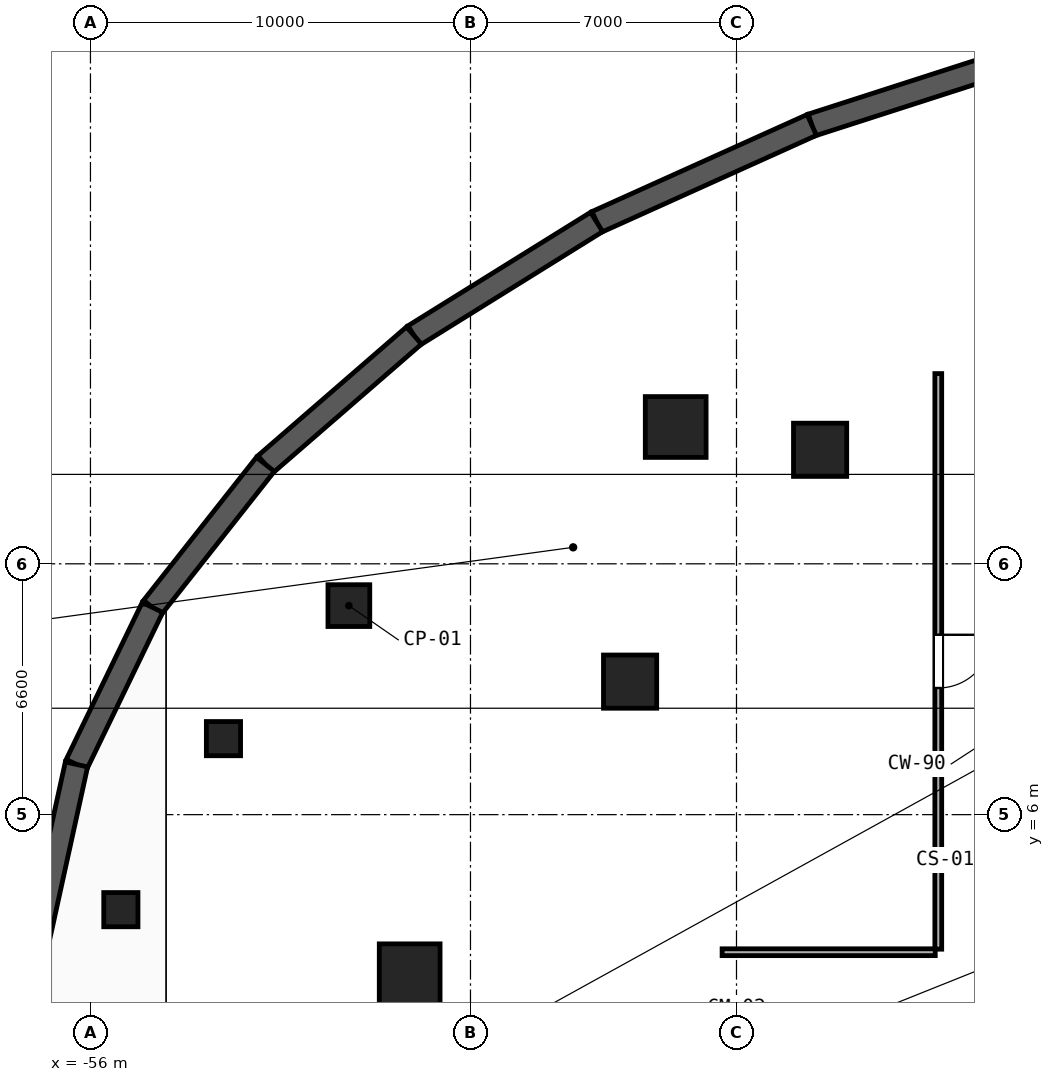
"""IFC4 building model, lengths in metres.
Left out: names, types, materials, properties, quantities, classifications, styles, units other than length and angle.
Written with IfcOpenShell. Run it as: python <this file> out.ifc"""

import sys

from ifc_helpers import new_model, si_unit, direction, frame, frame_2d, origin, origin_2d, place, context, subcontext, project, spatial, rectangle, circle, extrude, element, fill, save


model = new_model("IFC4")
c1 = context("Model", 3, precision=1e-05, world=origin(), true_north=direction((0.0, 1.0)))
c2 = subcontext(c1, "Body", "Model", "MODEL_VIEW")
j1 = project(units=[si_unit("LENGTHUNIT", "METRE"), si_unit("PLANEANGLEUNIT", "RADIAN")], contexts=[c1])
p1 = place(None, origin())
s1 = spatial("IfcSite", under=j1, at=p1, CompositionType="ELEMENT")
p2 = place(p1, origin())
s2 = spatial("IfcBuilding", under=s1, at=p2, CompositionType="ELEMENT")
p3 = place(p2, frame((0.0, 0.0, -9.0)))
s3 = spatial("IfcBuildingStorey", under=s2, at=p3, CompositionType="ELEMENT", Elevation=-9.0)
for number, where, z_axis, x_axis in (
    (1, (-41.8, 9.5, 0.0), (0.0, 0.0, 1.0), (1.0, 0.0, 0.0)),
    (2, (-36.8, 15.6, 0.0), (0.0, 0.0, 1.0), (1.0, 0.0, 0.0)),
):
    element("IfcColumn", number, at=place(p3, frame(where, z_axis=z_axis, x_axis=x_axis)), inside=s3, PredefinedType="COLUMN", context=c2, shape_type="SweptSolid", body=[
        extrude(rectangle(XDim=1.4, YDim=1.4, at=origin_2d()), origin(), (0.0, 0.0, 1.0), 4.5),
    ])
for number, where, z_axis, x_axis in (
    (3, (-40.6, 16.2, 0.0), (0.0, 0.0, 1.0), (1.0, 0.0, 0.0)),
    (4, (-47.6, 1.8, 0.0), (0.0, 0.0, 1.0), (1.0, 0.0, 0.0)),
):
    element("IfcColumn", number, at=place(p3, frame(where, z_axis=z_axis, x_axis=x_axis)), inside=s3, PredefinedType="COLUMN", context=c2, shape_type="SweptSolid", body=[
        extrude(rectangle(XDim=1.6, YDim=1.6, at=origin_2d()), origin(), (0.0, 0.0, 1.0), 4.5),
    ])
p4 = place(p3, frame((-49.2, 11.5, 0.0), z_axis=(0.0, 0.0, 1.0), x_axis=(1.0, 0.0, 0.0)))
e5 = element("IfcColumn", 5, at=p4, inside=s3, PredefinedType="PILASTER", context=c2, shape_type="SweptSolid", body=[
    extrude(circle(Radius=0.55, at=origin_2d()), origin(), (0.0, 0.0, 1.0), 4.5),
])
for number, where, z_axis, x_axis in (
    (6, (-52.5, 8.0, 0.0), (0.0, 0.0, 1.0), (1.0, 0.0, 0.0)),
    (7, (-55.2, 3.5, 0.0), (0.0, 0.0, 1.0), (1.0, 0.0, 0.0)),
):
    element("IfcColumn", number, at=place(p3, frame(where, z_axis=z_axis, x_axis=x_axis)), inside=s3, PredefinedType="COLUMN", context=c2, shape_type="SweptSolid", body=[
        extrude(rectangle(XDim=0.9, YDim=0.9, at=origin_2d()), origin(), (0.0, 0.0, 1.0), 4.5),
    ])
p5 = place(p3, frame((-30.546, 26.232, 0.0), z_axis=(0.0, 0.0, 1.0), x_axis=(-0.951843868052, -0.306583187492, 0.0)))
e8 = element("IfcWall", 8, at=p5, inside=s3, PredefinedType="USERDEFINED", context=c2, shape_type="SweptSolid", body=[
    extrude(rectangle(XDim=6.801, YDim=0.6, at=frame_2d((3.4, 0.0))), origin(), (0.0, 0.0, 1.0), 4.15),
])
p6 = place(p3, frame((-37.019, 24.147, 0.0), z_axis=(0.0, 0.0, 1.0), x_axis=(-0.911643952457, -0.410980904603, 0.0)))
e9 = element("IfcWall", 9, at=p6, inside=s3, PredefinedType="USERDEFINED", context=c2, shape_type="SweptSolid", body=[
    extrude(rectangle(XDim=6.209, YDim=0.6, at=frame_2d((3.105, 0.0))), origin(), (0.0, 0.0, 1.0), 4.15),
])
p7 = place(p3, frame((-42.68, 21.595, 0.0), z_axis=(0.0, 0.0, 1.0), x_axis=(-0.849299437699, -0.527911417877, 0.0)))
e10 = element("IfcWall", 10, at=p7, inside=s3, PredefinedType="USERDEFINED", context=c2, shape_type="SweptSolid", body=[
    extrude(rectangle(XDim=5.66, YDim=0.6, at=frame_2d((2.83, 0.0))), origin(), (0.0, 0.0, 1.0), 4.15),
])
p8 = place(p3, frame((-47.487, 18.607, 0.0), z_axis=(0.0, 0.0, 1.0), x_axis=(-0.755564536906, -0.655074217605, 0.0)))
e11 = element("IfcWall", 11, at=p8, inside=s3, PredefinedType="USERDEFINED", context=c2, shape_type="SweptSolid", body=[
    extrude(rectangle(XDim=5.175, YDim=0.6, at=frame_2d((2.587, 0.0))), origin(), (0.0, 0.0, 1.0), 4.15),
])
p9 = place(p3, frame((-51.397, 15.217, 0.0), z_axis=(0.0, 0.0, 1.0), x_axis=(-0.619447864054, -0.785037797637, 0.0)))
e12 = element("IfcWall", 12, at=p9, inside=s3, PredefinedType="USERDEFINED", context=c2, shape_type="SweptSolid", body=[
    extrude(rectangle(XDim=4.796, YDim=0.6, at=frame_2d((2.398, 0.0))), origin(), (0.0, 0.0, 1.0), 4.15),
])
p10 = place(p3, frame((-54.368, 11.452, 0.0), z_axis=(0.0, 0.0, 1.0), x_axis=(-0.435772260249, -0.900056963307, 0.0)))
e13 = element("IfcWall", 13, at=p10, inside=s3, PredefinedType="USERDEFINED", context=c2, shape_type="SweptSolid", body=[
    extrude(rectangle(XDim=4.59, YDim=0.6, at=frame_2d((2.295, 0.0))), origin(), (0.0, 0.0, 1.0), 4.15),
])
p11 = place(p3, frame((-56.368, 7.321, 0.0), z_axis=(0.0, 0.0, 1.0), x_axis=(-0.214510247434, -0.976721738135, 0.0)))
e14 = element("IfcWall", 14, at=p11, inside=s3, PredefinedType="USERDEFINED", context=c2, shape_type="SweptSolid", body=[
    extrude(rectangle(XDim=4.69, YDim=0.6, at=frame_2d((2.345, 0.0))), origin(), (0.0, 0.0, 1.0), 4.15),
])
p12 = place(p3, frame((-33.69, 17.605, 0.0), z_axis=(0.0, 0.0, 1.0), x_axis=(0.0, -1.0, 0.0)))
e15 = element("IfcWall", 15, at=p12, inside=s3, PredefinedType="PARTITIONING", context=c2, shape_type="SweptSolid", body=[
    extrude(rectangle(XDim=15.145, YDim=0.18, at=frame_2d((7.573, 0.0))), origin(), (0.0, 0.0, 1.0), 4.15),
])
p13 = place(p12, frame((6.873, 0.0, 0.0)))
e16 = element("IfcOpeningElement", 16, at=p13, cuts=e15, PredefinedType="OPENING", context=c2, shape_type="SweptSolid", body=[
    extrude(rectangle(XDim=1.4, YDim=2.2, at=frame_2d((0.7, 1.1))), frame((0.0, 0.1, 0.0), z_axis=(0.0, -1.0, 0.0), x_axis=(1.0, 0.0, 0.0)), (0.0, 0.0, 1.0), 0.2),
])
p14 = place(p3, frame((-33.77, 2.38, 0.0), z_axis=(0.0, 0.0, 1.0), x_axis=(-1.0, 0.0, 0.0)))
e17 = element("IfcWall", 17, at=p14, inside=s3, PredefinedType="PARTITIONING", context=c2, shape_type="SweptSolid", body=[
    extrude(rectangle(XDim=5.608, YDim=0.18, at=frame_2d((2.804, 0.0))), origin(), (0.0, 0.0, 1.0), 4.15),
])
p15 = place(p13, origin())
e18 = element("IfcDoor", 18, at=p15, inside=s3, OperationType="SINGLE_SWING_LEFT", PredefinedType="DOOR", context=c2, shape_type="SweptSolid", body=[
    extrude(rectangle(XDim=1.4, YDim=2.2, at=frame_2d((0.7, 1.1))), frame((0.0, 0.025, 0.0), z_axis=(0.0, -1.0, 0.0), x_axis=(1.0, 0.0, 0.0)), (0.0, 0.0, 1.0), 0.05),
])
fill(e16, e18)
save(model, sys.argv[1])
